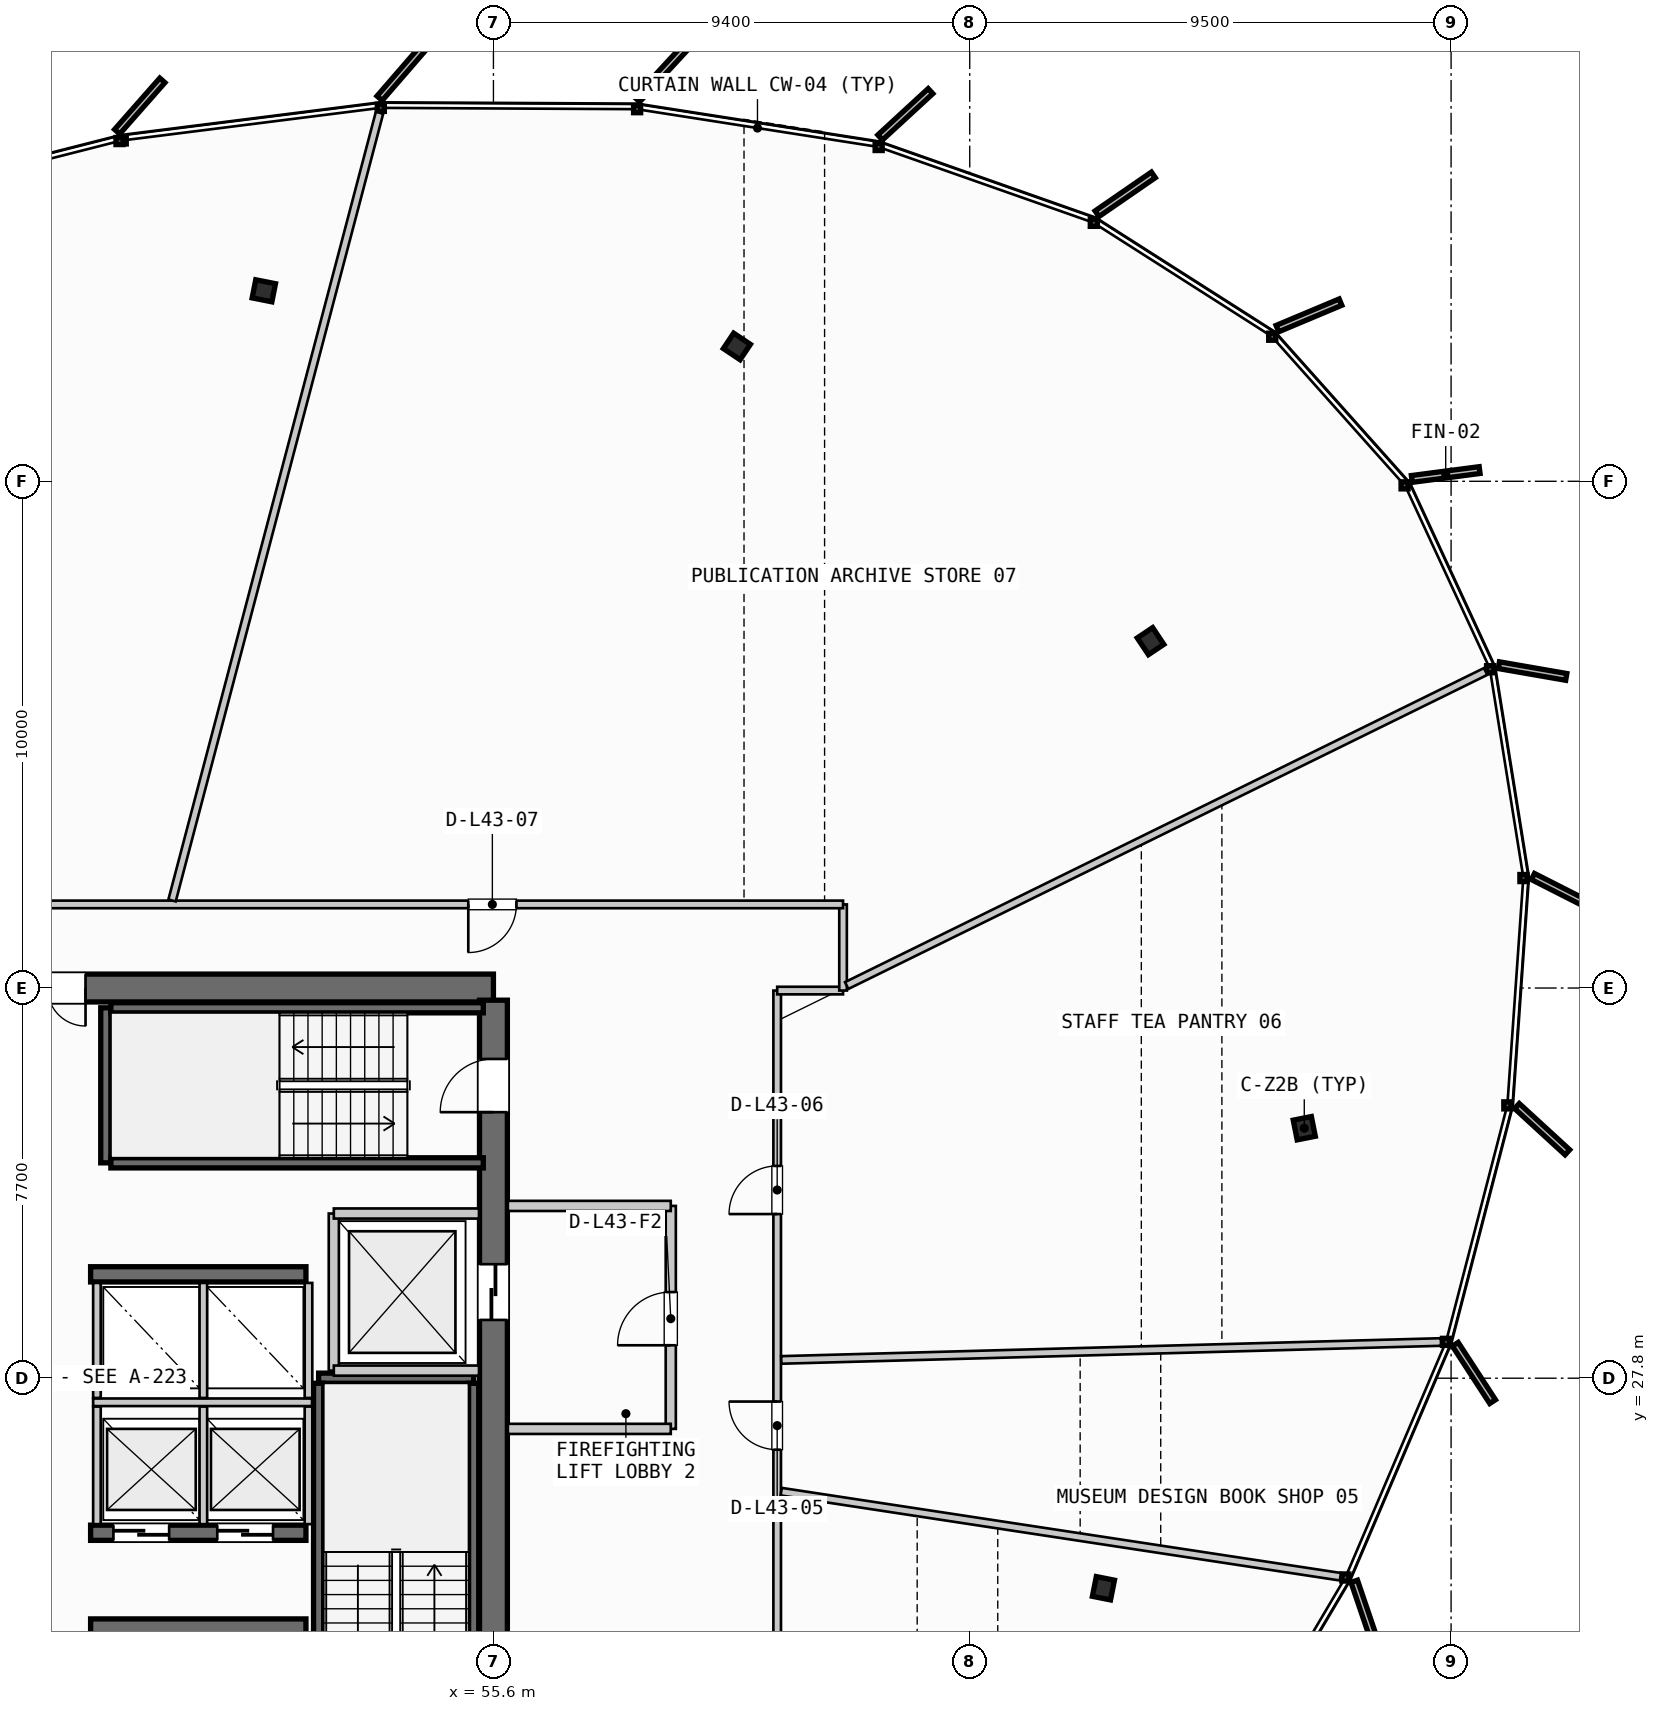
"""IFC4 building model, lengths in metres.
Left out: names, types, materials, properties, quantities, classifications, styles, units other than length and angle.
Written with IfcOpenShell. Run it as: python <this file> out.ifc"""

import sys

from ifc_helpers import new_model, si_unit, direction, frame, frame_2d, origin, origin_2d, place, context, subcontext, project, spatial, rectangle, i_section, extrude, source, transform, mapped, element, fill, save


model = new_model("IFC4")
c1 = context("Model", 3, precision=1e-05, world=origin(), true_north=direction((0.0, 1.0)))
c2 = subcontext(c1, "Body", "Model", "MODEL_VIEW")
j1 = project(units=[si_unit("LENGTHUNIT", "METRE"), si_unit("PLANEANGLEUNIT", "RADIAN")], contexts=[c1])
p1 = place(None, origin())
s1 = spatial("IfcSite", under=j1, at=p1, CompositionType="ELEMENT")
p2 = place(p1, origin())
s2 = spatial("IfcBuilding", under=s1, at=p2, CompositionType="ELEMENT")
p3 = place(p2, frame((0.0, 0.0, 167.85)))
s3 = spatial("IfcBuildingStorey", under=s2, at=p3, CompositionType="ELEMENT", Elevation=167.85)
p4 = place(p3, frame((55.6, 35.5, 0.0), z_axis=(0.0, 0.0, 1.0), x_axis=(-1.0, 0.0, 0.0)))
e1 = element("IfcWall", 1, at=p4, inside=s3, PredefinedType="SHEAR", context=c2, shape_type="SweptSolid", body=[
    extrude(rectangle(XDim=17.6, YDim=0.55, at=frame_2d((8.8, 0.0))), origin(), (0.0, 0.0, 1.0), 3.24),
])
p5 = place(p4, frame((8.05, 0.0, 0.0)))
e2 = element("IfcOpeningElement", 2, at=p5, cuts=e1, PredefinedType="OPENING", context=c2, shape_type="SweptSolid", body=[
    extrude(rectangle(XDim=1.5, YDim=2.2, at=frame_2d((0.75, 1.1))), frame((0.0, 0.285, 0.0), z_axis=(0.0, -1.0, 0.0), x_axis=(1.0, 0.0, 0.0)), (0.0, 0.0, 1.0), 0.57),
])
p6 = place(p4, frame((14.95, 0.0, 0.0)))
e3 = element("IfcOpeningElement", 3, at=p6, cuts=e1, PredefinedType="OPENING", context=c2, shape_type="SweptSolid", body=[
    extrude(rectangle(XDim=1.4, YDim=2.3, at=frame_2d((0.7, 1.15))), frame((0.0, 0.285, 0.0), z_axis=(0.0, -1.0, 0.0), x_axis=(1.0, 0.0, 0.0)), (0.0, 0.0, 1.0), 0.57),
])
p7 = place(p4, frame((12.3, 0.0, 0.0)))
e4 = element("IfcOpeningElement", 4, at=p7, cuts=e1, PredefinedType="OPENING", context=c2, shape_type="SweptSolid", body=[
    extrude(rectangle(XDim=0.95, YDim=2.15, at=frame_2d((0.475, 1.075))), frame((0.0, 0.285, 0.0), z_axis=(0.0, -1.0, 0.0), x_axis=(1.0, 0.0, 0.0)), (0.0, 0.0, 1.0), 0.57),
])
p8 = place(p4, frame((10.2, 0.0, 0.0)))
e5 = element("IfcOpeningElement", 5, at=p8, cuts=e1, PredefinedType="OPENING", context=c2, shape_type="SweptSolid", body=[
    extrude(rectangle(XDim=0.9, YDim=2.15, at=frame_2d((0.45, 1.075))), frame((0.0, 0.285, 0.0), z_axis=(0.0, -1.0, 0.0), x_axis=(1.0, 0.0, 0.0)), (0.0, 0.0, 1.0), 0.57),
])
p9 = place(p3, frame((55.6, 20.34, 0.0), z_axis=(0.0, 0.0, 1.0), x_axis=(0.0, 1.0, 0.0)))
e6 = element("IfcWall", 6, at=p9, inside=s3, PredefinedType="SHEAR", context=c2, shape_type="SweptSolid", body=[
    extrude(rectangle(XDim=14.92, YDim=0.55, at=frame_2d((7.46, 0.0))), origin(), (0.0, 0.0, 1.0), 3.24),
])
p10 = place(p9, frame((12.71, 0.0, 0.0)))
e7 = element("IfcOpeningElement", 7, at=p10, cuts=e6, PredefinedType="OPENING", context=c2, shape_type="SweptSolid", body=[
    extrude(rectangle(XDim=1.05, YDim=2.15, at=frame_2d((0.525, 1.075))), frame((0.0, 0.285, 0.0), z_axis=(0.0, -1.0, 0.0), x_axis=(1.0, 0.0, 0.0)), (0.0, 0.0, 1.0), 0.57),
])
p11 = place(p9, frame((8.61, 0.0, 0.0)))
e8 = element("IfcOpeningElement", 8, at=p11, cuts=e6, PredefinedType="OPENING", context=c2, shape_type="SweptSolid", body=[
    extrude(rectangle(XDim=1.1, YDim=2.2, at=frame_2d((0.55, 1.1))), frame((0.0, 0.285, 0.0), z_axis=(0.0, -1.0, 0.0), x_axis=(1.0, 0.0, 0.0)), (0.0, 0.0, 1.0), 0.57),
])
p12 = place(p3, frame((47.65, 22.9, 0.0), z_axis=(0.0, 0.0, 1.0), x_axis=(1.0, 0.0, 0.0)))
e9 = element("IfcWall", 9, at=p12, inside=s3, PredefinedType="SHEAR", context=c2, shape_type="SweptSolid", body=[
    extrude(rectangle(XDim=4.25, YDim=0.3, at=frame_2d((2.125, 0.0))), origin(), (0.0, 0.0, 1.0), 3.24),
])
p13 = place(p3, frame((47.65, 24.75, 0.0), z_axis=(0.0, 0.0, 1.0), x_axis=(1.0, 0.0, 0.0)))
e10 = element("IfcWall", 10, at=p13, inside=s3, PredefinedType="SHEAR", context=c2, shape_type="SweptSolid", body=[
    extrude(rectangle(XDim=4.25, YDim=0.3, at=frame_2d((2.125, 0.0))), origin(), (0.0, 0.0, 1.0), 3.24),
])
p14 = place(p13, frame((0.45, 0.0, 0.0)))
e11 = element("IfcOpeningElement", 11, at=p14, cuts=e10, PredefinedType="OPENING", context=c2, shape_type="SweptSolid", body=[
    extrude(rectangle(XDim=1.1, YDim=2.2, at=frame_2d((0.55, 1.1))), frame((0.0, 0.16, 0.0), z_axis=(0.0, -1.0, 0.0), x_axis=(1.0, 0.0, 0.0)), (0.0, 0.0, 1.0), 0.32),
])
p15 = place(p13, frame((2.5, 0.0, 0.0)))
e12 = element("IfcOpeningElement", 12, at=p15, cuts=e10, PredefinedType="OPENING", context=c2, shape_type="SweptSolid", body=[
    extrude(rectangle(XDim=1.1, YDim=2.2, at=frame_2d((0.55, 1.1))), frame((0.0, 0.16, 0.0), z_axis=(0.0, -1.0, 0.0), x_axis=(1.0, 0.0, 0.0)), (0.0, 0.0, 1.0), 0.32),
])
p16 = place(p3, frame((47.65, 29.85, 0.0), z_axis=(0.0, 0.0, 1.0), x_axis=(1.0, 0.0, 0.0)))
e13 = element("IfcWall", 13, at=p16, inside=s3, PredefinedType="SHEAR", context=c2, shape_type="SweptSolid", body=[
    extrude(rectangle(XDim=4.25, YDim=0.3, at=frame_2d((2.125, 0.0))), origin(), (0.0, 0.0, 1.0), 3.24),
])
m1 = source(origin(), c2, "Body", "SweptSolid", [
    extrude(i_section(OverallWidth=0.397, OverallDepth=0.365, WebThickness=0.028, FlangeThickness=0.044, FilletRadius=0.015, at=origin_2d()), origin(), (0.0, 0.0, 1.0), 3.24),
])
for number, where, z_axis, x_axis in (
    (14, (71.603, 32.733, 0.0), (0.0, 0.0, 1.0), (0.981, 0.195, 0.0)),
    (15, (68.569, 42.345, 0.0), (0.0, 0.0, 1.0), (0.831, 0.556, 0.0)),
    (16, (60.405, 48.161, 0.0), (0.0, 0.0, 1.0), (0.556, 0.831, 0.0)),
    (17, (51.069, 49.259, 0.0), (0.0, 0.0, 1.0), (0.195, 0.981, 0.0)),
    (18, (67.639, 23.655, 0.0), (0.0, 0.0, 1.0), (0.981, -0.195, 0.0)),
):
    element("IfcColumn", number, at=place(p3, frame(where, z_axis=z_axis, x_axis=x_axis)), inside=s3, PredefinedType="COLUMN", context=c2, shape_type="MappedRepresentation", body=[
        mapped(m1, transform((0.0, 0.0, 0.0), scale=1.0)),
    ])
p17 = place(p3, frame((52.15, 27.8, 0.0), z_axis=(0.0, 0.0, 1.0), x_axis=(1.0, 0.0, 0.0)))
e19 = element("IfcWall", 19, at=p17, inside=s3, PredefinedType="SHEAR", context=c2, shape_type="SweptSolid", body=[
    extrude(rectangle(XDim=3.06, YDim=0.2, at=frame_2d((1.53, 0.0))), origin(), (0.0, 0.0, 1.0), 3.24),
])
for number, where, z_axis, x_axis in (
    (20, (55.21, 27.7, 0.0), (0.0, 0.0, 1.0), (0.0, -1.0, 0.0)),
    (21, (52.15, 20.35, 0.0), (0.0, 0.0, 1.0), (0.0, 1.0, 0.0)),
):
    element("IfcWall", number, at=place(p3, frame(where, z_axis=z_axis, x_axis=x_axis)), inside=s3, PredefinedType="SHEAR", context=c2, shape_type="SweptSolid", body=[
        extrude(rectangle(XDim=7.35, YDim=0.2, at=frame_2d((3.675, 0.0))), origin(), (0.0, 0.0, 1.0), 3.24),
    ])
p18 = place(p3, frame((47.95, 32.05, 0.0), z_axis=(0.0, 0.0, 1.0), x_axis=(0.0, 1.0, 0.0)))
e22 = element("IfcWall", 22, at=p18, inside=s3, PredefinedType="SHEAR", context=c2, shape_type="SweptSolid", body=[
    extrude(rectangle(XDim=3.06, YDim=0.2, at=frame_2d((1.53, 0.0))), origin(), (0.0, 0.0, 1.0), 3.24),
])
for number, where, z_axis, x_axis in (
    (23, (48.05, 35.11, 0.0), (0.0, 0.0, 1.0), (1.0, 0.0, 0.0)),
    (24, (55.4, 32.05, 0.0), (0.0, 0.0, 1.0), (-1.0, 0.0, 0.0)),
):
    element("IfcWall", number, at=place(p3, frame(where, z_axis=z_axis, x_axis=x_axis)), inside=s3, PredefinedType="SHEAR", context=c2, shape_type="SweptSolid", body=[
        extrude(rectangle(XDim=7.35, YDim=0.2, at=frame_2d((3.675, 0.0))), origin(), (0.0, 0.0, 1.0), 3.24),
    ])
p19 = place(p3, frame((52.45, 27.95, 0.0), z_axis=(0.0, 0.0, 1.0), x_axis=(0.0, 1.0, 0.0)))
e25 = element("IfcWall", 25, at=p19, inside=s3, PredefinedType="PARTITIONING", context=c2, shape_type="SweptSolid", body=[
    extrude(rectangle(XDim=3.1, YDim=0.2, at=frame_2d((1.55, 0.0))), origin(), (0.0, 0.0, 1.0), 2.28),
])
for number, where, z_axis, x_axis in (
    (26, (52.45, 27.95, 0.0), (0.0, 0.0, 1.0), (1.0, 0.0, 0.0)),
    (27, (52.45, 31.05, 0.0), (0.0, 0.0, 1.0), (1.0, 0.0, 0.0)),
):
    element("IfcWall", number, at=place(p3, frame(where, z_axis=z_axis, x_axis=x_axis)), inside=s3, PredefinedType="PARTITIONING", context=c2, shape_type="SweptSolid", body=[
        extrude(rectangle(XDim=2.865, YDim=0.2, at=frame_2d((1.433, 0.0))), origin(), (0.0, 0.0, 1.0), 2.28),
    ])
p20 = place(p3, frame((59.1, 26.8, 0.0), z_axis=(0.0, 0.0, 1.0), x_axis=(0.0, 1.0, 0.0)))
e28 = element("IfcWall", 28, at=p20, inside=s3, PredefinedType="PARTITIONING", context=c2, shape_type="SweptSolid", body=[
    extrude(rectangle(XDim=4.4, YDim=0.2, at=frame_2d((2.2, 0.0))), origin(), (0.0, 0.0, 1.0), 2.28),
])
p21 = place(p20, frame((1.65, 0.0, 0.0)))
e29 = element("IfcOpeningElement", 29, at=p21, cuts=e28, PredefinedType="OPENING", context=c2, shape_type="SweptSolid", body=[
    extrude(rectangle(XDim=1.05, YDim=2.15, at=frame_2d((0.525, 1.075))), frame((0.0, 0.11, 0.0), z_axis=(0.0, -1.0, 0.0), x_axis=(1.0, 0.0, 0.0)), (0.0, 0.0, 1.0), 0.22),
])
for number, where, z_axis, x_axis in (
    (30, (55.885, 26.8, 0.0), (0.0, 0.0, 1.0), (1.0, 0.0, 0.0)),
    (31, (55.885, 31.2, 0.0), (0.0, 0.0, 1.0), (1.0, 0.0, 0.0)),
):
    element("IfcWall", number, at=place(p3, frame(where, z_axis=z_axis, x_axis=x_axis)), inside=s3, PredefinedType="PARTITIONING", context=c2, shape_type="SweptSolid", body=[
        extrude(rectangle(XDim=3.215, YDim=0.2, at=frame_2d((1.607, 0.0))), origin(), (0.0, 0.0, 1.0), 2.28),
    ])
p22 = place(p3, frame((47.7, 27.325, 0.0), z_axis=(0.0, 0.0, 1.0), x_axis=(1.0, 0.0, 0.0)))
e32 = element("IfcWall", 32, at=p22, inside=s3, PredefinedType="PARTITIONING", context=c2, shape_type="SweptSolid", body=[
    extrude(rectangle(XDim=4.32, YDim=0.15, at=frame_2d((2.16, 0.0))), origin(), (0.0, 0.0, 1.0), 2.28),
])
for number, where, z_axis, x_axis in (
    (33, (47.775, 24.92, 0.0), (0.0, 0.0, 1.0), (0.0, 1.0, 0.0)),
    (34, (49.875, 24.92, 0.0), (0.0, 0.0, 1.0), (0.0, 1.0, 0.0)),
    (35, (51.95, 24.92, 0.0), (0.0, 0.0, 1.0), (0.0, 1.0, 0.0)),
):
    element("IfcWall", number, at=place(p3, frame(where, z_axis=z_axis, x_axis=x_axis)), inside=s3, PredefinedType="PARTITIONING", context=c2, shape_type="SweptSolid", body=[
        extrude(rectangle(XDim=2.32, YDim=0.15, at=frame_2d((1.16, 0.0))), origin(), (0.0, 0.0, 1.0), 2.28),
    ])
for number, where, z_axis, x_axis in (
    (36, (47.775, 27.41, 0.0), (0.0, 0.0, 1.0), (0.0, 1.0, 0.0)),
    (37, (49.875, 27.41, 0.0), (0.0, 0.0, 1.0), (0.0, 1.0, 0.0)),
    (38, (51.95, 27.41, 0.0), (0.0, 0.0, 1.0), (0.0, 1.0, 0.0)),
):
    element("IfcWall", number, at=place(p3, frame(where, z_axis=z_axis, x_axis=x_axis)), inside=s3, PredefinedType="PARTITIONING", context=c2, shape_type="SweptSolid", body=[
        extrude(rectangle(XDim=2.27, YDim=0.15, at=frame_2d((1.135, 0.0))), origin(), (0.0, 0.0, 1.0), 2.28),
    ])
p23 = place(p3, frame((61.2, 20.15, 0.0), z_axis=(0.0, 0.0, 1.0), x_axis=(0.0, 1.0, 0.0)))
e39 = element("IfcWall", 39, at=p23, inside=s3, PredefinedType="PARTITIONING", context=c2, shape_type="SweptSolid", body=[
    extrude(rectangle(XDim=15.3, YDim=0.15, at=frame_2d((7.65, 0.0))), origin(), (0.0, 0.0, 1.0), 2.28),
])
p24 = place(p23, frame((6.24, 0.0, 0.0)))
e40 = element("IfcOpeningElement", 40, at=p24, cuts=e39, PredefinedType="OPENING", context=c2, shape_type="SweptSolid", body=[
    extrude(rectangle(XDim=0.95, YDim=2.15, at=frame_2d((0.475, 1.075))), frame((0.0, 0.085, 0.0), z_axis=(0.0, -1.0, 0.0), x_axis=(1.0, 0.0, 0.0)), (0.0, 0.0, 1.0), 0.17),
])
p25 = place(p23, frame((10.889, 0.0, 0.0)))
e41 = element("IfcOpeningElement", 41, at=p25, cuts=e39, PredefinedType="OPENING", context=c2, shape_type="SweptSolid", body=[
    extrude(rectangle(XDim=0.95, YDim=2.15, at=frame_2d((0.475, 1.075))), frame((0.0, 0.085, 0.0), z_axis=(0.0, -1.0, 0.0), x_axis=(1.0, 0.0, 0.0)), (0.0, 0.0, 1.0), 0.17),
])
p26 = place(p3, frame((61.2, 35.45, 0.0), z_axis=(0.0, 0.0, 1.0), x_axis=(1.0, 0.0, 0.0)))
e42 = element("IfcWall", 42, at=p26, inside=s3, PredefinedType="PARTITIONING", context=c2, shape_type="SweptSolid", body=[
    extrude(rectangle(XDim=1.3, YDim=0.15, at=frame_2d((0.65, 0.0))), origin(), (0.0, 0.0, 1.0), 2.28),
])
p27 = place(p3, frame((62.5, 35.45, 0.0), z_axis=(0.0, 0.0, 1.0), x_axis=(0.0, 1.0, 0.0)))
e43 = element("IfcWall", 43, at=p27, inside=s3, PredefinedType="PARTITIONING", context=c2, shape_type="SweptSolid", body=[
    extrude(rectangle(XDim=1.7, YDim=0.15, at=frame_2d((0.85, 0.0))), origin(), (0.0, 0.0, 1.0), 2.28),
])
p28 = place(p3, frame((62.5, 37.15, 0.0), z_axis=(0.0, 0.0, 1.0), x_axis=(-1.0, 0.0, 0.0)))
e44 = element("IfcWall", 44, at=p28, inside=s3, PredefinedType="PARTITIONING", context=c2, shape_type="SweptSolid", body=[
    extrude(rectangle(XDim=31.4, YDim=0.15, at=frame_2d((15.7, 0.0))), origin(), (0.0, 0.0, 1.0), 2.28),
])
p29 = place(p28, frame((6.446, 0.0, 0.0)))
e45 = element("IfcOpeningElement", 45, at=p29, cuts=e44, PredefinedType="OPENING", context=c2, shape_type="SweptSolid", body=[
    extrude(rectangle(XDim=0.95, YDim=2.15, at=frame_2d((0.475, 1.075))), frame((0.0, 0.085, 0.0), z_axis=(0.0, -1.0, 0.0), x_axis=(1.0, 0.0, 0.0)), (0.0, 0.0, 1.0), 0.17),
])
p30 = place(p28, frame((18.808, 0.0, 0.0)))
e46 = element("IfcOpeningElement", 46, at=p30, cuts=e44, PredefinedType="OPENING", context=c2, shape_type="SweptSolid", body=[
    extrude(rectangle(XDim=0.95, YDim=2.15, at=frame_2d((0.475, 1.075))), frame((0.0, 0.085, 0.0), z_axis=(0.0, -1.0, 0.0), x_axis=(1.0, 0.0, 0.0)), (0.0, 0.0, 1.0), 0.17),
])
p31 = place(p3, frame((61.279, 25.562, 0.0), z_axis=(0.0, 0.0, 1.0), x_axis=(0.988621170769, -0.150426662225, 0.0)))
e47 = element("IfcWall", 47, at=p31, inside=s3, PredefinedType="PARTITIONING", context=c2, shape_type="SweptSolid", body=[
    extrude(rectangle(XDim=11.163, YDim=0.15, at=frame_2d((5.582, 0.0))), origin(), (0.0, 0.0, 1.0), 2.28),
])
p32 = place(p3, frame((61.28, 28.161, 0.0), z_axis=(0.0, 0.0, 1.0), x_axis=(0.999631059962, 0.027161442505, 0.0)))
e48 = element("IfcWall", 48, at=p32, inside=s3, PredefinedType="PARTITIONING", context=c2, shape_type="SweptSolid", body=[
    extrude(rectangle(XDim=13.024, YDim=0.15, at=frame_2d((6.512, 0.0))), origin(), (0.0, 0.0, 1.0), 2.28),
])
p33 = place(p3, frame((62.572, 35.549, 0.0), z_axis=(0.0, 0.0, 1.0), x_axis=(0.897447412434, 0.441121459369, 0.0)))
e49 = element("IfcWall", 49, at=p33, inside=s3, PredefinedType="PARTITIONING", context=c2, shape_type="SweptSolid", body=[
    extrude(rectangle(XDim=14.05, YDim=0.15, at=frame_2d((7.025, 0.0))), origin(), (0.0, 0.0, 1.0), 2.28),
])
p34 = place(p3, frame((49.258, 37.227, 0.0), z_axis=(0.0, 0.0, 1.0), x_axis=(0.25468017692, 0.967025339629, 0.0)))
e50 = element("IfcWall", 50, at=p34, inside=s3, PredefinedType="PARTITIONING", context=c2, shape_type="SweptSolid", body=[
    extrude(rectangle(XDim=16.076, YDim=0.15, at=frame_2d((8.038, 0.0))), origin(), (0.0, 0.0, 1.0), 2.28),
])
m2 = source(origin(), c2, "Body", "SweptSolid", [
    extrude(rectangle(XDim=1.05, YDim=2.15, at=frame_2d((0.525, 1.075))), frame((0.0, 0.025, 0.0), z_axis=(0.0, -1.0, 0.0), x_axis=(1.0, 0.0, 0.0)), (0.0, 0.0, 1.0), 0.05),
])
p35 = place(p10, origin())
e51 = element("IfcDoor", 51, at=p35, inside=s3, OperationType="SINGLE_SWING_LEFT", PredefinedType="DOOR", context=c2, shape_type="MappedRepresentation", body=[
    mapped(m2, transform((0.0, 0.0, 0.0), scale=1.0)),
])
fill(e7, e51)
m3 = source(origin(), c2, "Body", "SweptSolid", [
    extrude(rectangle(XDim=1.5, YDim=2.2, at=frame_2d((0.75, 1.1))), frame((0.0, 0.025, 0.0), z_axis=(0.0, -1.0, 0.0), x_axis=(1.0, 0.0, 0.0)), (0.0, 0.0, 1.0), 0.05),
])
p36 = place(p5, origin())
e52 = element("IfcDoor", 52, at=p36, inside=s3, OperationType="DOUBLE_DOOR_SINGLE_SWING", PredefinedType="DOOR", context=c2, shape_type="MappedRepresentation", body=[
    mapped(m3, transform((0.0, 0.0, 0.0), scale=1.0)),
])
fill(e2, e52)
m4 = source(origin(), c2, "Body", "SweptSolid", [
    extrude(rectangle(XDim=1.1, YDim=2.2, at=frame_2d((0.55, 1.1))), frame((0.0, 0.025, 0.0), z_axis=(0.0, -1.0, 0.0), x_axis=(1.0, 0.0, 0.0)), (0.0, 0.0, 1.0), 0.05),
])
p37 = place(p11, origin())
e53 = element("IfcDoor", 53, at=p37, inside=s3, OperationType="SLIDING_TO_RIGHT", PredefinedType="DOOR", context=c2, shape_type="MappedRepresentation", body=[
    mapped(m4, transform((0.0, 0.0, 0.0), scale=1.0)),
])
fill(e8, e53)
p38 = place(p14, origin())
e54 = element("IfcDoor", 54, at=p38, inside=s3, OperationType="SLIDING_TO_RIGHT", PredefinedType="DOOR", context=c2, shape_type="MappedRepresentation", body=[
    mapped(m4, transform((0.0, 0.0, 0.0), scale=1.0)),
])
fill(e11, e54)
p39 = place(p15, origin())
e55 = element("IfcDoor", 55, at=p39, inside=s3, OperationType="SLIDING_TO_RIGHT", PredefinedType="DOOR", context=c2, shape_type="MappedRepresentation", body=[
    mapped(m4, transform((0.0, 0.0, 0.0), scale=1.0)),
])
fill(e12, e55)
p40 = place(p21, origin())
e56 = element("IfcDoor", 56, at=p40, inside=s3, OperationType="SINGLE_SWING_LEFT", PredefinedType="DOOR", context=c2, shape_type="MappedRepresentation", body=[
    mapped(m2, transform((0.0, 0.0, 0.0), scale=1.0)),
])
fill(e29, e56)
m5 = source(origin(), c2, "Body", "SweptSolid", [
    extrude(rectangle(XDim=0.95, YDim=2.15, at=frame_2d((0.475, 1.075))), frame((0.0, 0.025, 0.0), z_axis=(0.0, -1.0, 0.0), x_axis=(1.0, 0.0, 0.0)), (0.0, 0.0, 1.0), 0.05),
])
p41 = place(p24, origin())
e57 = element("IfcDoor", 57, at=p41, inside=s3, OperationType="SINGLE_SWING_RIGHT", PredefinedType="DOOR", context=c2, shape_type="MappedRepresentation", body=[
    mapped(m5, transform((0.0, 0.0, 0.0), scale=1.0)),
])
fill(e40, e57)
p42 = place(p25, origin())
e58 = element("IfcDoor", 58, at=p42, inside=s3, OperationType="SINGLE_SWING_LEFT", PredefinedType="DOOR", context=c2, shape_type="MappedRepresentation", body=[
    mapped(m5, transform((0.0, 0.0, 0.0), scale=1.0)),
])
fill(e41, e58)
p43 = place(p29, origin())
e59 = element("IfcDoor", 59, at=p43, inside=s3, OperationType="SINGLE_SWING_RIGHT", PredefinedType="DOOR", context=c2, shape_type="MappedRepresentation", body=[
    mapped(m5, transform((0.0, 0.0, 0.0), scale=1.0)),
])
fill(e45, e59)
save(model, sys.argv[1])
